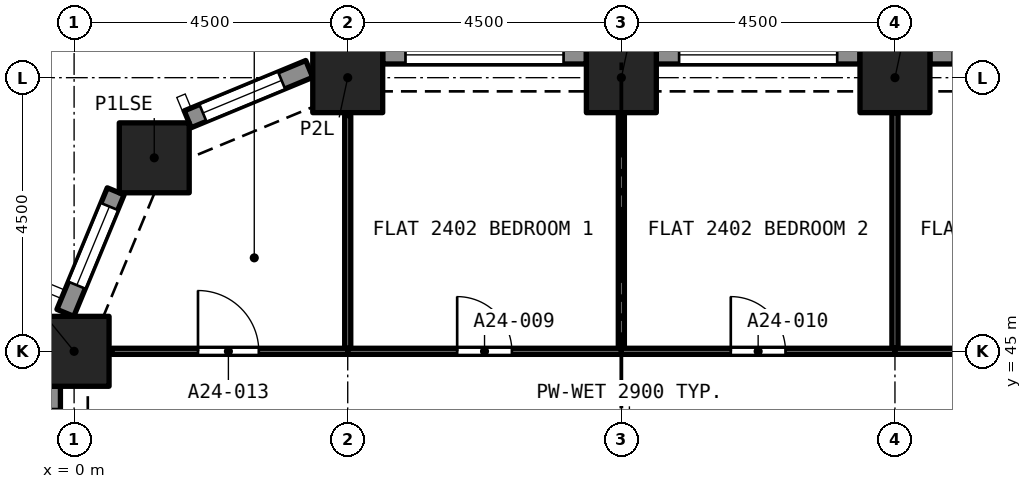
"""IFC4 building model, lengths in metres.
Left out: names, types, materials, properties, quantities, classifications, styles, units other than length and angle.
Written with IfcOpenShell. Run it as: python <this file> out.ifc"""

import sys

from ifc_helpers import new_model, si_unit, direction, frame, frame_2d, origin, origin_2d, place, context, subcontext, project, spatial, rectangle, extrude, element, fill, save


model = new_model("IFC4")
c1 = context("Model", 3, precision=1e-05, world=origin(), true_north=direction((0.0, 1.0)))
c2 = subcontext(c1, "Body", "Model", "MODEL_VIEW")
j1 = project(units=[si_unit("LENGTHUNIT", "METRE"), si_unit("PLANEANGLEUNIT", "RADIAN")], contexts=[c1])
p1 = place(None, origin())
s1 = spatial("IfcSite", under=j1, at=p1, CompositionType="ELEMENT")
p2 = place(p1, origin())
s2 = spatial("IfcBuilding", under=s1, at=p2, CompositionType="ELEMENT")
p3 = place(p2, frame((0.0, 0.0, 89.6)))
s3 = spatial("IfcBuildingStorey", under=s2, at=p3, CompositionType="ELEMENT", Elevation=89.6)
for number, where, z_axis, x_axis in (
    (1, (0.0, 45.0, 0.0), (0.0, 0.0, 1.0), (1.0, 0.0, 0.0)),
    (2, (1.318, 48.182, 0.0), (0.0, 0.0, 1.0), (1.0, 0.0, 0.0)),
    (3, (4.5, 49.5, 0.0), (0.0, 0.0, 1.0), (1.0, 0.0, 0.0)),
    (4, (9.0, 49.5, 0.0), (0.0, 0.0, 1.0), (1.0, 0.0, 0.0)),
    (5, (13.5, 49.5, 0.0), (0.0, 0.0, 1.0), (1.0, 0.0, 0.0)),
):
    element("IfcColumn", number, at=place(p3, frame(where, z_axis=z_axis, x_axis=x_axis)), inside=s3, PredefinedType="COLUMN", context=c2, shape_type="SweptSolid", body=[
        extrude(rectangle(XDim=1.15, YDim=1.15, at=origin_2d()), origin(), (0.0, 0.0, 1.0), 3.2),
    ])
p4 = place(p3, frame((14.075, 49.875, 0.0), z_axis=(0.0, 0.0, 1.0), x_axis=(1.0, 0.0, 0.0)))
e6 = element("IfcWall", 6, at=p4, inside=s3, PredefinedType="SOLIDWALL", context=c2, shape_type="SweptSolid", body=[
    extrude(rectangle(XDim=3.35, YDim=0.3, at=frame_2d((1.675, 0.0))), origin(), (0.0, 0.0, 1.0), 3.2),
])
p5 = place(p4, frame((0.375, 0.0, 0.45)))
e7 = element("IfcOpeningElement", 7, at=p5, cuts=e6, PredefinedType="OPENING", context=c2, shape_type="SweptSolid", body=[
    extrude(rectangle(XDim=2.6, YDim=1.95, at=frame_2d((1.3, 0.975))), frame((0.0, 0.16, 0.0), z_axis=(0.0, -1.0, 0.0), x_axis=(1.0, 0.0, 0.0)), (0.0, 0.0, 1.0), 0.32),
])
p6 = place(p3, frame((9.575, 49.875, 0.0), z_axis=(0.0, 0.0, 1.0), x_axis=(1.0, 0.0, 0.0)))
e8 = element("IfcWall", 8, at=p6, inside=s3, PredefinedType="SOLIDWALL", context=c2, shape_type="SweptSolid", body=[
    extrude(rectangle(XDim=3.35, YDim=0.3, at=frame_2d((1.675, 0.0))), origin(), (0.0, 0.0, 1.0), 3.2),
])
p7 = place(p6, frame((0.375, 0.0, 0.45)))
e9 = element("IfcOpeningElement", 9, at=p7, cuts=e8, PredefinedType="OPENING", context=c2, shape_type="SweptSolid", body=[
    extrude(rectangle(XDim=2.6, YDim=1.95, at=frame_2d((1.3, 0.975))), frame((0.0, 0.16, 0.0), z_axis=(0.0, -1.0, 0.0), x_axis=(1.0, 0.0, 0.0)), (0.0, 0.0, 1.0), 0.32),
])
p8 = place(p3, frame((5.075, 49.875, 0.0), z_axis=(0.0, 0.0, 1.0), x_axis=(1.0, 0.0, 0.0)))
e10 = element("IfcWall", 10, at=p8, inside=s3, PredefinedType="SOLIDWALL", context=c2, shape_type="SweptSolid", body=[
    extrude(rectangle(XDim=3.35, YDim=0.3, at=frame_2d((1.675, 0.0))), origin(), (0.0, 0.0, 1.0), 3.2),
])
p9 = place(p8, frame((0.375, 0.0, 0.45)))
e11 = element("IfcOpeningElement", 11, at=p9, cuts=e10, PredefinedType="OPENING", context=c2, shape_type="SweptSolid", body=[
    extrude(rectangle(XDim=2.6, YDim=1.95, at=frame_2d((1.3, 0.975))), frame((0.0, 0.16, 0.0), z_axis=(0.0, -1.0, 0.0), x_axis=(1.0, 0.0, 0.0)), (0.0, 0.0, 1.0), 0.32),
])
p10 = place(p3, frame((1.869, 48.816, 0.0), z_axis=(0.0, 0.0, 1.0), x_axis=(0.923862802911, 0.382723818695, 0.0)))
e12 = element("IfcWall", 12, at=p10, inside=s3, PredefinedType="SOLIDWALL", context=c2, shape_type="SweptSolid", body=[
    extrude(rectangle(XDim=2.164, YDim=0.3, at=frame_2d((1.082, 0.0))), origin(), (0.0, 0.0, 1.0), 3.2),
])
p11 = place(p10, frame((0.271, 0.0, 0.45)))
e13 = element("IfcOpeningElement", 13, at=p11, cuts=e12, PredefinedType="OPENING", context=c2, shape_type="SweptSolid", body=[
    extrude(rectangle(XDim=1.4, YDim=1.95, at=frame_2d((0.7, 0.975))), frame((0.0, 0.16, 0.0), z_axis=(0.0, -1.0, 0.0), x_axis=(1.0, 0.0, 0.0)), (0.0, 0.0, 1.0), 0.32),
])
p12 = place(p3, frame((-0.144, 45.632, 0.0), z_axis=(0.0, 0.0, 1.0), x_axis=(0.382723818695, 0.923862802911, 0.0)))
e14 = element("IfcWall", 14, at=p12, inside=s3, PredefinedType="SOLIDWALL", context=c2, shape_type="SweptSolid", body=[
    extrude(rectangle(XDim=2.164, YDim=0.3, at=frame_2d((1.082, 0.0))), origin(), (0.0, 0.0, 1.0), 3.2),
])
p13 = place(p12, frame((0.493, 0.0, 0.45)))
e15 = element("IfcOpeningElement", 15, at=p13, cuts=e14, PredefinedType="OPENING", context=c2, shape_type="SweptSolid", body=[
    extrude(rectangle(XDim=1.4, YDim=1.95, at=frame_2d((0.7, 0.975))), frame((0.0, 0.16, 0.0), z_axis=(0.0, -1.0, 0.0), x_axis=(1.0, 0.0, 0.0)), (0.0, 0.0, 1.0), 0.32),
])
p14 = place(p3, frame((-0.375, 41.075, 0.0), z_axis=(0.0, 0.0, 1.0), x_axis=(0.0, 1.0, 0.0)))
e16 = element("IfcWall", 16, at=p14, inside=s3, PredefinedType="SOLIDWALL", context=c2, shape_type="SweptSolid", body=[
    extrude(rectangle(XDim=3.35, YDim=0.3, at=frame_2d((1.675, 0.0))), origin(), (0.0, 0.0, 1.0), 3.2),
])
p15 = place(p14, frame((0.375, 0.0, 0.45)))
e17 = element("IfcOpeningElement", 17, at=p15, cuts=e16, PredefinedType="OPENING", context=c2, shape_type="SweptSolid", body=[
    extrude(rectangle(XDim=2.6, YDim=1.95, at=frame_2d((1.3, 0.975))), frame((0.0, 0.16, 0.0), z_axis=(0.0, -1.0, 0.0), x_axis=(1.0, 0.0, 0.0)), (0.0, 0.0, 1.0), 0.32),
])
p16 = place(p3, frame((9.0, 45.05, 0.0), z_axis=(0.0, 0.0, 1.0), x_axis=(0.0, 1.0, 0.0)))
e18 = element("IfcWall", 18, at=p16, inside=s3, PredefinedType="PARTITIONING", context=c2, shape_type="SweptSolid", body=[
    extrude(rectangle(XDim=3.875, YDim=0.1, at=frame_2d((1.938, 0.0))), origin(), (0.0, 0.0, 1.0), 2.9),
])
p17 = place(p3, frame((4.5, 45.0, 0.0), z_axis=(0.0, 0.0, 1.0), x_axis=(1.0, 0.0, 0.0)))
e19 = element("IfcWall", 19, at=p17, inside=s3, PredefinedType="PARTITIONING", context=c2, shape_type="SweptSolid", body=[
    extrude(rectangle(XDim=4.5, YDim=0.1, at=frame_2d((2.25, 0.0))), origin(), (0.0, 0.0, 1.0), 2.9),
])
p18 = place(p17, frame((1.8, 0.0, 0.0)))
e20 = element("IfcOpeningElement", 20, at=p18, cuts=e19, PredefinedType="OPENING", context=c2, shape_type="SweptSolid", body=[
    extrude(rectangle(XDim=0.9, YDim=2.1, at=frame_2d((0.45, 1.05))), frame((0.0, 0.06, 0.0), z_axis=(0.0, -1.0, 0.0), x_axis=(1.0, 0.0, 0.0)), (0.0, 0.0, 1.0), 0.12),
])
p19 = place(p3, frame((4.5, 45.05, 0.0), z_axis=(0.0, 0.0, 1.0), x_axis=(0.0, 1.0, 0.0)))
e21 = element("IfcWall", 21, at=p19, inside=s3, PredefinedType="PARTITIONING", context=c2, shape_type="SweptSolid", body=[
    extrude(rectangle(XDim=3.828, YDim=0.1, at=frame_2d((1.914, 0.0))), origin(), (0.0, 0.0, 1.0), 2.9),
])
p20 = place(p3, frame((13.5, 45.05, 0.0), z_axis=(0.0, 0.0, 1.0), x_axis=(0.0, 1.0, 0.0)))
e22 = element("IfcWall", 22, at=p20, inside=s3, PredefinedType="PARTITIONING", context=c2, shape_type="SweptSolid", body=[
    extrude(rectangle(XDim=3.875, YDim=0.1, at=frame_2d((1.938, 0.0))), origin(), (0.0, 0.0, 1.0), 2.9),
])
p21 = place(p3, frame((9.0, 45.0, 0.0), z_axis=(0.0, 0.0, 1.0), x_axis=(1.0, 0.0, 0.0)))
e23 = element("IfcWall", 23, at=p21, inside=s3, PredefinedType="PARTITIONING", context=c2, shape_type="SweptSolid", body=[
    extrude(rectangle(XDim=4.5, YDim=0.1, at=frame_2d((2.25, 0.0))), origin(), (0.0, 0.0, 1.0), 2.9),
])
p22 = place(p21, frame((1.8, 0.0, 0.0)))
e24 = element("IfcOpeningElement", 24, at=p22, cuts=e23, PredefinedType="OPENING", context=c2, shape_type="SweptSolid", body=[
    extrude(rectangle(XDim=0.9, YDim=2.1, at=frame_2d((0.45, 1.05))), frame((0.0, 0.06, 0.0), z_axis=(0.0, -1.0, 0.0), x_axis=(1.0, 0.0, 0.0)), (0.0, 0.0, 1.0), 0.12),
])
p23 = place(p3, frame((13.5, 45.0, 0.0), z_axis=(0.0, 0.0, 1.0), x_axis=(1.0, 0.0, 0.0)))
e25 = element("IfcWall", 25, at=p23, inside=s3, PredefinedType="PARTITIONING", context=c2, shape_type="SweptSolid", body=[
    extrude(rectangle(XDim=3.925, YDim=0.1, at=frame_2d((1.962, 0.0))), origin(), (0.0, 0.0, 1.0), 2.9),
])
p24 = place(p23, frame((1.8, 0.0, 0.0)))
e26 = element("IfcOpeningElement", 26, at=p24, cuts=e25, PredefinedType="OPENING", context=c2, shape_type="SweptSolid", body=[
    extrude(rectangle(XDim=0.9, YDim=2.1, at=frame_2d((0.45, 1.05))), frame((0.0, 0.06, 0.0), z_axis=(0.0, -1.0, 0.0), x_axis=(1.0, 0.0, 0.0)), (0.0, 0.0, 1.0), 0.12),
])
p25 = place(p3, frame((0.622, 45.0, 0.0), z_axis=(0.0, 0.0, 1.0), x_axis=(1.0, 0.0, 0.0)))
e27 = element("IfcWall", 27, at=p25, inside=s3, PredefinedType="PARTITIONING", context=c2, shape_type="SweptSolid", body=[
    extrude(rectangle(XDim=3.878, YDim=0.1, at=frame_2d((1.939, 0.0))), origin(), (0.0, 0.0, 1.0), 2.9),
])
p26 = place(p25, frame((1.415, 0.0, 0.0)))
e28 = element("IfcOpeningElement", 28, at=p26, cuts=e27, PredefinedType="OPENING", context=c2, shape_type="SweptSolid", body=[
    extrude(rectangle(XDim=1.0, YDim=2.1, at=frame_2d((0.5, 1.05))), frame((0.0, 0.06, 0.0), z_axis=(0.0, -1.0, 0.0), x_axis=(1.0, 0.0, 0.0)), (0.0, 0.0, 1.0), 0.12),
])
p27 = place(p7, origin())
e29 = element("IfcWindow", 29, at=p27, inside=s3, PartitioningType="SINGLE_PANEL", PredefinedType="WINDOW", context=c2, shape_type="SweptSolid", body=[
    extrude(rectangle(XDim=2.6, YDim=1.95, at=frame_2d((1.3, 0.975))), frame((0.0, 0.03, 0.0), z_axis=(0.0, -1.0, 0.0), x_axis=(1.0, 0.0, 0.0)), (0.0, 0.0, 1.0), 0.06),
])
fill(e9, e29)
p28 = place(p9, origin())
e30 = element("IfcWindow", 30, at=p28, inside=s3, PartitioningType="SINGLE_PANEL", PredefinedType="WINDOW", context=c2, shape_type="SweptSolid", body=[
    extrude(rectangle(XDim=2.6, YDim=1.95, at=frame_2d((1.3, 0.975))), frame((0.0, 0.03, 0.0), z_axis=(0.0, -1.0, 0.0), x_axis=(1.0, 0.0, 0.0)), (0.0, 0.0, 1.0), 0.06),
])
fill(e11, e30)
p29 = place(p11, origin())
e31 = element("IfcWindow", 31, at=p29, inside=s3, PartitioningType="SINGLE_PANEL", PredefinedType="WINDOW", context=c2, shape_type="SweptSolid", body=[
    extrude(rectangle(XDim=1.4, YDim=1.95, at=frame_2d((0.7, 0.975))), frame((0.0, 0.03, 0.0), z_axis=(0.0, -1.0, 0.0), x_axis=(1.0, 0.0, 0.0)), (0.0, 0.0, 1.0), 0.06),
])
fill(e13, e31)
p30 = place(p13, origin())
e32 = element("IfcWindow", 32, at=p30, inside=s3, PartitioningType="SINGLE_PANEL", PredefinedType="WINDOW", context=c2, shape_type="SweptSolid", body=[
    extrude(rectangle(XDim=1.4, YDim=1.95, at=frame_2d((0.7, 0.975))), frame((0.0, 0.03, 0.0), z_axis=(0.0, -1.0, 0.0), x_axis=(1.0, 0.0, 0.0)), (0.0, 0.0, 1.0), 0.06),
])
fill(e15, e32)
p31 = place(p18, origin())
e33 = element("IfcDoor", 33, at=p31, inside=s3, OperationType="SINGLE_SWING_RIGHT", PredefinedType="DOOR", context=c2, shape_type="SweptSolid", body=[
    extrude(rectangle(XDim=0.9, YDim=2.1, at=frame_2d((0.45, 1.05))), frame((0.0, 0.025, 0.0), z_axis=(0.0, -1.0, 0.0), x_axis=(1.0, 0.0, 0.0)), (0.0, 0.0, 1.0), 0.05),
])
fill(e20, e33)
p32 = place(p22, origin())
e34 = element("IfcDoor", 34, at=p32, inside=s3, OperationType="SINGLE_SWING_LEFT", PredefinedType="DOOR", context=c2, shape_type="SweptSolid", body=[
    extrude(rectangle(XDim=0.9, YDim=2.1, at=frame_2d((0.45, 1.05))), frame((0.0, 0.025, 0.0), z_axis=(0.0, -1.0, 0.0), x_axis=(1.0, 0.0, 0.0)), (0.0, 0.0, 1.0), 0.05),
])
fill(e24, e34)
p33 = place(p26, origin())
e35 = element("IfcDoor", 35, at=p33, inside=s3, OperationType="SINGLE_SWING_LEFT", PredefinedType="DOOR", context=c2, shape_type="SweptSolid", body=[
    extrude(rectangle(XDim=1.0, YDim=2.1, at=frame_2d((0.5, 1.05))), frame((0.0, 0.025, 0.0), z_axis=(0.0, -1.0, 0.0), x_axis=(1.0, 0.0, 0.0)), (0.0, 0.0, 1.0), 0.05),
])
fill(e28, e35)
save(model, sys.argv[1])
